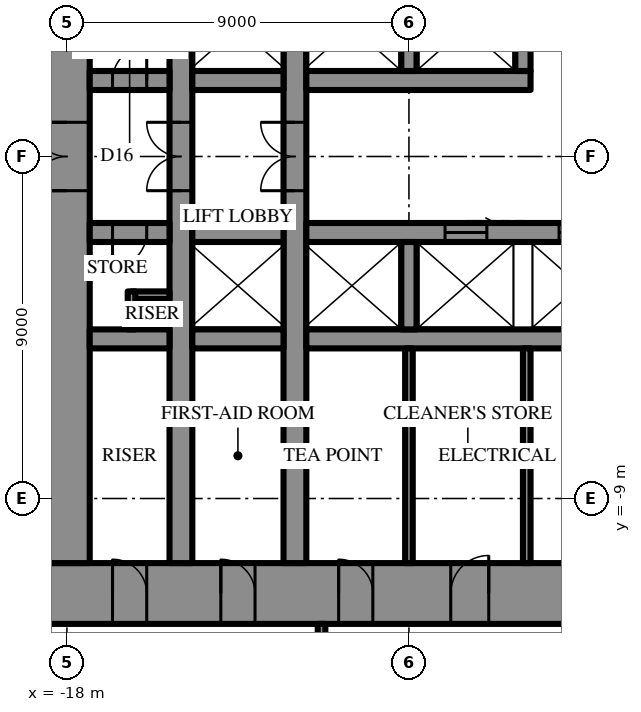
"""IFC4 building model, lengths in metres.
Left out: names, types, materials, properties, quantities, classifications, styles, units other than length and angle.
Written with IfcOpenShell. Run it as: python <this file> out.ifc"""

import sys

from ifc_helpers import new_model, si_unit, direction, frame, frame_2d, origin, place, context, subcontext, project, spatial, rectangle, extrude, element, fill, save


model = new_model("IFC4")
c1 = context("Model", 3, precision=1e-05, world=origin(), true_north=direction((0.0, 1.0)))
c2 = subcontext(c1, "Body", "Model", "MODEL_VIEW")
j1 = project(units=[si_unit("LENGTHUNIT", "METRE"), si_unit("PLANEANGLEUNIT", "RADIAN")], contexts=[c1])
p1 = place(None, origin())
s1 = spatial("IfcSite", under=j1, at=p1, CompositionType="ELEMENT")
p2 = place(p1, origin())
s2 = spatial("IfcBuilding", under=s1, at=p2, CompositionType="ELEMENT")
p3 = place(p2, frame((0.0, 0.0, 190.9)))
s3 = spatial("IfcBuildingStorey", under=s2, at=p3, CompositionType="ELEMENT", Elevation=190.9)
p4 = place(p3, frame((18.6, -11.5, 0.0), z_axis=(0.0, 0.0, 1.0), x_axis=(-1.0, 0.0, 0.0)))
e1 = element("IfcWall", 1, at=p4, inside=s3, PredefinedType="SHEAR", context=c2, shape_type="SweptSolid", body=[
    extrude(rectangle(XDim=37.2, YDim=1.6, at=frame_2d((18.6, 0.0))), origin(), (0.0, 0.0, 1.0), 4.2),
])
p5 = place(p4, frame((19.45, 0.0, 0.0)))
e2 = element("IfcOpeningElement", 2, at=p5, cuts=e1, PredefinedType="OPENING", context=c2, shape_type="SweptSolid", body=[
    extrude(rectangle(XDim=0.9, YDim=2.2, at=frame_2d((0.45, 1.1))), frame((0.0, 0.81, 0.0), z_axis=(0.0, -1.0, 0.0), x_axis=(1.0, 0.0, 0.0)), (0.0, 0.0, 1.0), 1.62),
])
p6 = place(p4, frame((22.45, 0.0, 0.0)))
e3 = element("IfcOpeningElement", 3, at=p6, cuts=e1, PredefinedType="OPENING", context=c2, shape_type="SweptSolid", body=[
    extrude(rectangle(XDim=0.9, YDim=2.2, at=frame_2d((0.45, 1.1))), frame((0.0, 0.81, 0.0), z_axis=(0.0, -1.0, 0.0), x_axis=(1.0, 0.0, 0.0)), (0.0, 0.0, 1.0), 1.62),
])
p7 = place(p4, frame((25.5, 0.0, 0.0)))
e4 = element("IfcOpeningElement", 4, at=p7, cuts=e1, PredefinedType="OPENING", context=c2, shape_type="SweptSolid", body=[
    extrude(rectangle(XDim=1.0, YDim=2.2, at=frame_2d((0.5, 1.1))), frame((0.0, 0.81, 0.0), z_axis=(0.0, -1.0, 0.0), x_axis=(1.0, 0.0, 0.0)), (0.0, 0.0, 1.0), 1.62),
])
p8 = place(p4, frame((1.8, 0.0, 0.0)))
e5 = element("IfcOpeningElement", 5, at=p8, cuts=e1, PredefinedType="OPENING", context=c2, shape_type="SweptSolid", body=[
    extrude(rectangle(XDim=0.9, YDim=2.2, at=frame_2d((0.45, 1.1))), frame((0.0, 0.81, 0.0), z_axis=(0.0, -1.0, 0.0), x_axis=(1.0, 0.0, 0.0)), (0.0, 0.0, 1.0), 1.62),
])
p9 = place(p4, frame((4.65, 0.0, 0.0)))
e6 = element("IfcOpeningElement", 6, at=p9, cuts=e1, PredefinedType="OPENING", context=c2, shape_type="SweptSolid", body=[
    extrude(rectangle(XDim=0.9, YDim=2.2, at=frame_2d((0.45, 1.1))), frame((0.0, 0.81, 0.0), z_axis=(0.0, -1.0, 0.0), x_axis=(1.0, 0.0, 0.0)), (0.0, 0.0, 1.0), 1.62),
])
p10 = place(p4, frame((7.75, 0.0, 0.0)))
e7 = element("IfcOpeningElement", 7, at=p10, cuts=e1, PredefinedType="OPENING", context=c2, shape_type="SweptSolid", body=[
    extrude(rectangle(XDim=0.9, YDim=2.2, at=frame_2d((0.45, 1.1))), frame((0.0, 0.81, 0.0), z_axis=(0.0, -1.0, 0.0), x_axis=(1.0, 0.0, 0.0)), (0.0, 0.0, 1.0), 1.62),
])
p11 = place(p4, frame((28.55, 0.0, 0.0)))
e8 = element("IfcOpeningElement", 8, at=p11, cuts=e1, PredefinedType="OPENING", context=c2, shape_type="SweptSolid", body=[
    extrude(rectangle(XDim=0.9, YDim=2.2, at=frame_2d((0.45, 1.1))), frame((0.0, 0.81, 0.0), z_axis=(0.0, -1.0, 0.0), x_axis=(1.0, 0.0, 0.0)), (0.0, 0.0, 1.0), 1.62),
])
p12 = place(p4, frame((31.65, 0.0, 0.0)))
e9 = element("IfcOpeningElement", 9, at=p12, cuts=e1, PredefinedType="OPENING", context=c2, shape_type="SweptSolid", body=[
    extrude(rectangle(XDim=0.9, YDim=2.2, at=frame_2d((0.45, 1.1))), frame((0.0, 0.81, 0.0), z_axis=(0.0, -1.0, 0.0), x_axis=(1.0, 0.0, 0.0)), (0.0, 0.0, 1.0), 1.62),
])
p13 = place(p4, frame((34.5, 0.0, 0.0)))
e10 = element("IfcOpeningElement", 10, at=p13, cuts=e1, PredefinedType="OPENING", context=c2, shape_type="SweptSolid", body=[
    extrude(rectangle(XDim=0.9, YDim=2.2, at=frame_2d((0.45, 1.1))), frame((0.0, 0.81, 0.0), z_axis=(0.0, -1.0, 0.0), x_axis=(1.0, 0.0, 0.0)), (0.0, 0.0, 1.0), 1.62),
])
p14 = place(p3, frame((-18.0, 10.7, 0.0), z_axis=(0.0, 0.0, 1.0), x_axis=(0.0, -1.0, 0.0)))
e11 = element("IfcWall", 11, at=p14, inside=s3, PredefinedType="SHEAR", context=c2, shape_type="SweptSolid", body=[
    extrude(rectangle(XDim=21.4, YDim=1.2, at=frame_2d((10.7, 0.0))), origin(), (0.0, 0.0, 1.0), 4.2),
])
p15 = place(p14, frame((9.8, 0.0, 0.0)))
e12 = element("IfcOpeningElement", 12, at=p15, cuts=e11, PredefinedType="OPENING", context=c2, shape_type="SweptSolid", body=[
    extrude(rectangle(XDim=1.8, YDim=2.4, at=frame_2d((0.9, 1.2))), frame((0.0, 0.61, 0.0), z_axis=(0.0, -1.0, 0.0), x_axis=(1.0, 0.0, 0.0)), (0.0, 0.0, 1.0), 1.22),
])
p16 = place(p3, frame((-12.0, -10.7, 0.0), z_axis=(0.0, 0.0, 1.0), x_axis=(0.0, 1.0, 0.0)))
e13 = element("IfcWall", 13, at=p16, inside=s3, PredefinedType="SHEAR", context=c2, shape_type="SweptSolid", body=[
    extrude(rectangle(XDim=21.4, YDim=0.6, at=frame_2d((10.7, 0.0))), origin(), (0.0, 0.0, 1.0), 4.2),
])
p17 = place(p16, frame((9.8, 0.0, 0.0)))
e14 = element("IfcOpeningElement", 14, at=p17, cuts=e13, PredefinedType="OPENING", context=c2, shape_type="SweptSolid", body=[
    extrude(rectangle(XDim=1.8, YDim=2.4, at=frame_2d((0.9, 1.2))), frame((0.0, 0.31, 0.0), z_axis=(0.0, -1.0, 0.0), x_axis=(1.0, 0.0, 0.0)), (0.0, 0.0, 1.0), 0.62),
])
p18 = place(p3, frame((-15.0, -10.7, 0.0), z_axis=(0.0, 0.0, 1.0), x_axis=(0.0, 1.0, 0.0)))
e15 = element("IfcWall", 15, at=p18, inside=s3, PredefinedType="SHEAR", context=c2, shape_type="SweptSolid", body=[
    extrude(rectangle(XDim=21.4, YDim=0.6, at=frame_2d((10.7, 0.0))), origin(), (0.0, 0.0, 1.0), 4.2),
])
p19 = place(p18, frame((9.8, 0.0, 0.0)))
e16 = element("IfcOpeningElement", 16, at=p19, cuts=e15, PredefinedType="OPENING", context=c2, shape_type="SweptSolid", body=[
    extrude(rectangle(XDim=1.8, YDim=2.4, at=frame_2d((0.9, 1.2))), frame((0.0, 0.31, 0.0), z_axis=(0.0, -1.0, 0.0), x_axis=(1.0, 0.0, 0.0)), (0.0, 0.0, 1.0), 0.62),
])
p20 = place(p3, frame((-17.4, 2.0, 0.0), z_axis=(0.0, 0.0, 1.0), x_axis=(1.0, 0.0, 0.0)))
e17 = element("IfcWall", 17, at=p20, inside=s3, PredefinedType="SHEAR", context=c2, shape_type="SweptSolid", body=[
    extrude(rectangle(XDim=2.1, YDim=0.5, at=frame_2d((1.05, 0.0))), origin(), (0.0, 0.0, 1.0), 4.2),
])
p21 = place(p20, frame((0.6, 0.0, 0.0)))
e18 = element("IfcOpeningElement", 18, at=p21, cuts=e17, PredefinedType="OPENING", context=c2, shape_type="SweptSolid", body=[
    extrude(rectangle(XDim=0.9, YDim=2.2, at=frame_2d((0.45, 1.1))), frame((0.0, 0.26, 0.0), z_axis=(0.0, -1.0, 0.0), x_axis=(1.0, 0.0, 0.0)), (0.0, 0.0, 1.0), 0.52),
])
p22 = place(p3, frame((-14.7, 2.0, 0.0), z_axis=(0.0, 0.0, 1.0), x_axis=(1.0, 0.0, 0.0)))
e19 = element("IfcWall", 19, at=p22, inside=s3, PredefinedType="SHEAR", context=c2, shape_type="SweptSolid", body=[
    extrude(rectangle(XDim=2.4, YDim=0.5, at=frame_2d((1.2, 0.0))), origin(), (0.0, 0.0, 1.0), 4.2),
])
p23 = place(p3, frame((-11.7, 2.0, 0.0), z_axis=(0.0, 0.0, 1.0), x_axis=(1.0, 0.0, 0.0)))
e20 = element("IfcWall", 20, at=p23, inside=s3, PredefinedType="SHEAR", context=c2, shape_type="SweptSolid", body=[
    extrude(rectangle(XDim=5.9, YDim=0.5, at=frame_2d((2.95, 0.0))), origin(), (0.0, 0.0, 1.0), 4.2),
])
for number, where, z_axis, x_axis in (
    (21, (-9.0, 2.25, 0.0), (0.0, 0.0, 1.0), (0.0, 1.0, 0.0)),
    (22, (-6.0, 2.25, 0.0), (0.0, 0.0, 1.0), (0.0, 1.0, 0.0)),
):
    element("IfcWall", number, at=place(p3, frame(where, z_axis=z_axis, x_axis=x_axis)), inside=s3, PredefinedType="SHEAR", context=c2, shape_type="SweptSolid", body=[
        extrude(rectangle(XDim=2.3, YDim=0.4, at=frame_2d((1.15, 0.0))), origin(), (0.0, 0.0, 1.0), 4.2),
    ])
p24 = place(p3, frame((3.2, -2.0, 0.0), z_axis=(0.0, 0.0, 1.0), x_axis=(-1.0, 0.0, 0.0)))
e23 = element("IfcWall", 23, at=p24, inside=s3, PredefinedType="SHEAR", context=c2, shape_type="SweptSolid", body=[
    extrude(rectangle(XDim=14.9, YDim=0.5, at=frame_2d((7.45, 0.0))), origin(), (0.0, 0.0, 1.0), 4.2),
])
p25 = place(p24, frame((1.15, 0.0, 0.0)))
e24 = element("IfcOpeningElement", 24, at=p25, cuts=e23, PredefinedType="OPENING", context=c2, shape_type="SweptSolid", body=[
    extrude(rectangle(XDim=1.1, YDim=2.2, at=frame_2d((0.55, 1.1))), frame((0.0, 0.26, 0.0), z_axis=(0.0, -1.0, 0.0), x_axis=(1.0, 0.0, 0.0)), (0.0, 0.0, 1.0), 0.52),
])
p26 = place(p24, frame((4.15, 0.0, 0.0)))
e25 = element("IfcOpeningElement", 25, at=p26, cuts=e23, PredefinedType="OPENING", context=c2, shape_type="SweptSolid", body=[
    extrude(rectangle(XDim=1.1, YDim=2.2, at=frame_2d((0.55, 1.1))), frame((0.0, 0.26, 0.0), z_axis=(0.0, -1.0, 0.0), x_axis=(1.0, 0.0, 0.0)), (0.0, 0.0, 1.0), 0.52),
])
p27 = place(p24, frame((7.15, 0.0, 0.0)))
e26 = element("IfcOpeningElement", 26, at=p27, cuts=e23, PredefinedType="OPENING", context=c2, shape_type="SweptSolid", body=[
    extrude(rectangle(XDim=1.1, YDim=2.2, at=frame_2d((0.55, 1.1))), frame((0.0, 0.26, 0.0), z_axis=(0.0, -1.0, 0.0), x_axis=(1.0, 0.0, 0.0)), (0.0, 0.0, 1.0), 0.52),
])
p28 = place(p24, frame((10.15, 0.0, 0.0)))
e27 = element("IfcOpeningElement", 27, at=p28, cuts=e23, PredefinedType="OPENING", context=c2, shape_type="SweptSolid", body=[
    extrude(rectangle(XDim=1.1, YDim=2.2, at=frame_2d((0.55, 1.1))), frame((0.0, 0.26, 0.0), z_axis=(0.0, -1.0, 0.0), x_axis=(1.0, 0.0, 0.0)), (0.0, 0.0, 1.0), 0.52),
])
p29 = place(p3, frame((-12.3, -2.0, 0.0), z_axis=(0.0, 0.0, 1.0), x_axis=(-1.0, 0.0, 0.0)))
e28 = element("IfcWall", 28, at=p29, inside=s3, PredefinedType="SHEAR", context=c2, shape_type="SweptSolid", body=[
    extrude(rectangle(XDim=2.4, YDim=0.5, at=frame_2d((1.2, 0.0))), origin(), (0.0, 0.0, 1.0), 4.2),
])
p30 = place(p3, frame((-15.3, -2.0, 0.0), z_axis=(0.0, 0.0, 1.0), x_axis=(-1.0, 0.0, 0.0)))
e29 = element("IfcWall", 29, at=p30, inside=s3, PredefinedType="SHEAR", context=c2, shape_type="SweptSolid", body=[
    extrude(rectangle(XDim=2.1, YDim=0.5, at=frame_2d((1.05, 0.0))), origin(), (0.0, 0.0, 1.0), 4.2),
])
p31 = place(p30, frame((0.6, 0.0, 0.0)))
e30 = element("IfcOpeningElement", 30, at=p31, cuts=e29, PredefinedType="OPENING", context=c2, shape_type="SweptSolid", body=[
    extrude(rectangle(XDim=0.9, YDim=2.2, at=frame_2d((0.45, 1.1))), frame((0.0, 0.26, 0.0), z_axis=(0.0, -1.0, 0.0), x_axis=(1.0, 0.0, 0.0)), (0.0, 0.0, 1.0), 0.52),
])
p32 = place(p3, frame((11.7, -4.8, 0.0), z_axis=(0.0, 0.0, 1.0), x_axis=(-1.0, 0.0, 0.0)))
e31 = element("IfcWall", 31, at=p32, inside=s3, PredefinedType="SHEAR", context=c2, shape_type="SweptSolid", body=[
    extrude(rectangle(XDim=23.4, YDim=0.5, at=frame_2d((11.7, 0.0))), origin(), (0.0, 0.0, 1.0), 4.2),
])
p33 = place(p32, frame((6.6, 0.0, 0.0)))
e32 = element("IfcOpeningElement", 32, at=p33, cuts=e31, PredefinedType="OPENING", context=c2, shape_type="SweptSolid", body=[
    extrude(rectangle(XDim=1.2, YDim=2.2, at=frame_2d((0.6, 1.1))), frame((0.0, 0.26, 0.0), z_axis=(0.0, -1.0, 0.0), x_axis=(1.0, 0.0, 0.0)), (0.0, 0.0, 1.0), 0.52),
])
p34 = place(p32, frame((3.6, 0.0, 0.0)))
e33 = element("IfcOpeningElement", 33, at=p34, cuts=e31, PredefinedType="OPENING", context=c2, shape_type="SweptSolid", body=[
    extrude(rectangle(XDim=1.2, YDim=2.2, at=frame_2d((0.6, 1.1))), frame((0.0, 0.26, 0.0), z_axis=(0.0, -1.0, 0.0), x_axis=(1.0, 0.0, 0.0)), (0.0, 0.0, 1.0), 0.52),
])
p35 = place(p3, frame((-12.3, -4.8, 0.0), z_axis=(0.0, 0.0, 1.0), x_axis=(-1.0, 0.0, 0.0)))
e34 = element("IfcWall", 34, at=p35, inside=s3, PredefinedType="SHEAR", context=c2, shape_type="SweptSolid", body=[
    extrude(rectangle(XDim=2.4, YDim=0.5, at=frame_2d((1.2, 0.0))), origin(), (0.0, 0.0, 1.0), 4.2),
])
p36 = place(p3, frame((-15.3, -4.8, 0.0), z_axis=(0.0, 0.0, 1.0), x_axis=(-1.0, 0.0, 0.0)))
e35 = element("IfcWall", 35, at=p36, inside=s3, PredefinedType="SHEAR", context=c2, shape_type="SweptSolid", body=[
    extrude(rectangle(XDim=2.1, YDim=0.5, at=frame_2d((1.05, 0.0))), origin(), (0.0, 0.0, 1.0), 4.2),
])
p37 = place(p3, frame((-9.0, -2.25, 0.0), z_axis=(0.0, 0.0, 1.0), x_axis=(0.0, -1.0, 0.0)))
e36 = element("IfcWall", 36, at=p37, inside=s3, PredefinedType="SHEAR", context=c2, shape_type="SweptSolid", body=[
    extrude(rectangle(XDim=2.3, YDim=0.4, at=frame_2d((1.15, 0.0))), origin(), (0.0, 0.0, 1.0), 4.2),
])
for number, where, z_axis, x_axis in (
    (37, (-9.0, -5.05, 0.0), (0.0, 0.0, 1.0), (0.0, -1.0, 0.0)),
    (38, (-5.9, -5.05, 0.0), (0.0, 0.0, 1.0), (0.0, -1.0, 0.0)),
):
    element("IfcWall", number, at=place(p3, frame(where, z_axis=z_axis, x_axis=x_axis)), inside=s3, PredefinedType="PARTITIONING", context=c2, shape_type="SweptSolid", body=[
        extrude(rectangle(XDim=5.65, YDim=0.2, at=frame_2d((2.825, 0.0))), origin(), (0.0, 0.0, 1.0), 4.0),
    ])
for number, where, z_axis, x_axis in (
    (39, (-15.3, -3.65, 0.0), (0.0, 0.0, 1.0), (-1.0, 0.0, 0.0)),
    (40, (-16.3, -3.55, 0.0), (0.0, 0.0, 1.0), (0.0, -1.0, 0.0)),
):
    element("IfcWall", number, at=place(p3, frame(where, z_axis=z_axis, x_axis=x_axis)), inside=s3, PredefinedType="PARTITIONING", context=c2, shape_type="SweptSolid", body=[
        extrude(rectangle(XDim=1.0, YDim=0.2, at=frame_2d((0.5, 0.0))), origin(), (0.0, 0.0, 1.0), 4.0),
    ])
p38 = place(p3, frame((-11.3, -12.3, 0.0), z_axis=(0.0, 0.0, 1.0), x_axis=(0.0, -1.0, 0.0)))
e41 = element("IfcWall", 41, at=p38, inside=s3, PredefinedType="PARTITIONING", context=c2, shape_type="SweptSolid", body=[
    extrude(rectangle(XDim=19.0, YDim=0.2, at=frame_2d((9.5, 0.0))), origin(), (0.0, 0.0, 1.0), 4.0),
])
p39 = place(p38, frame((1.4, 0.0, 0.0)))
e42 = element("IfcOpeningElement", 42, at=p39, cuts=e41, PredefinedType="OPENING", context=c2, shape_type="SweptSolid", body=[
    extrude(rectangle(XDim=1.0, YDim=2.2, at=frame_2d((0.5, 1.1))), frame((0.0, 0.11, 0.0), z_axis=(0.0, -1.0, 0.0), x_axis=(1.0, 0.0, 0.0)), (0.0, 0.0, 1.0), 0.22),
])
p40 = place(p15, frame((1.8, 0.0, 0.0), z_axis=(0.0, 0.0, 1.0), x_axis=(-1.0, 0.0, 0.0)))
e43 = element("IfcDoor", 43, at=p40, inside=s3, OperationType="DOUBLE_DOOR_SINGLE_SWING", PredefinedType="DOOR", context=c2, shape_type="SweptSolid", body=[
    extrude(rectangle(XDim=1.8, YDim=2.4, at=frame_2d((0.9, 1.2))), frame((0.0, 0.025, 0.0), z_axis=(0.0, -1.0, 0.0), x_axis=(1.0, 0.0, 0.0)), (0.0, 0.0, 1.0), 0.05),
])
fill(e12, e43)
p41 = place(p7, frame((1.0, 0.0, 0.0), z_axis=(0.0, 0.0, 1.0), x_axis=(-1.0, 0.0, 0.0)))
e44 = element("IfcDoor", 44, at=p41, inside=s3, OperationType="SINGLE_SWING_LEFT", PredefinedType="DOOR", context=c2, shape_type="SweptSolid", body=[
    extrude(rectangle(XDim=1.0, YDim=2.2, at=frame_2d((0.5, 1.1))), frame((0.0, 0.025, 0.0), z_axis=(0.0, -1.0, 0.0), x_axis=(1.0, 0.0, 0.0)), (0.0, 0.0, 1.0), 0.05),
])
fill(e4, e44)
p42 = place(p11, frame((0.9, 0.0, 0.0), z_axis=(0.0, 0.0, 1.0), x_axis=(-1.0, 0.0, 0.0)))
e45 = element("IfcDoor", 45, at=p42, inside=s3, OperationType="SINGLE_SWING_RIGHT", PredefinedType="DOOR", context=c2, shape_type="SweptSolid", body=[
    extrude(rectangle(XDim=0.9, YDim=2.2, at=frame_2d((0.45, 1.1))), frame((0.0, 0.025, 0.0), z_axis=(0.0, -1.0, 0.0), x_axis=(1.0, 0.0, 0.0)), (0.0, 0.0, 1.0), 0.05),
])
fill(e8, e45)
p43 = place(p12, frame((0.9, 0.0, 0.0), z_axis=(0.0, 0.0, 1.0), x_axis=(-1.0, 0.0, 0.0)))
e46 = element("IfcDoor", 46, at=p43, inside=s3, OperationType="SINGLE_SWING_RIGHT", PredefinedType="DOOR", context=c2, shape_type="SweptSolid", body=[
    extrude(rectangle(XDim=0.9, YDim=2.2, at=frame_2d((0.45, 1.1))), frame((0.0, 0.025, 0.0), z_axis=(0.0, -1.0, 0.0), x_axis=(1.0, 0.0, 0.0)), (0.0, 0.0, 1.0), 0.05),
])
fill(e9, e46)
p44 = place(p13, frame((0.9, 0.0, 0.0), z_axis=(0.0, 0.0, 1.0), x_axis=(-1.0, 0.0, 0.0)))
e47 = element("IfcDoor", 47, at=p44, inside=s3, OperationType="SINGLE_SWING_RIGHT", PredefinedType="DOOR", context=c2, shape_type="SweptSolid", body=[
    extrude(rectangle(XDim=0.9, YDim=2.2, at=frame_2d((0.45, 1.1))), frame((0.0, 0.025, 0.0), z_axis=(0.0, -1.0, 0.0), x_axis=(1.0, 0.0, 0.0)), (0.0, 0.0, 1.0), 0.05),
])
fill(e10, e47)
p45 = place(p21, origin())
e48 = element("IfcDoor", 48, at=p45, inside=s3, OperationType="SINGLE_SWING_LEFT", PredefinedType="DOOR", context=c2, shape_type="SweptSolid", body=[
    extrude(rectangle(XDim=0.9, YDim=2.2, at=frame_2d((0.45, 1.1))), frame((0.0, 0.025, 0.0), z_axis=(0.0, -1.0, 0.0), x_axis=(1.0, 0.0, 0.0)), (0.0, 0.0, 1.0), 0.05),
])
fill(e18, e48)
p46 = place(p31, origin())
e49 = element("IfcDoor", 49, at=p46, inside=s3, OperationType="SINGLE_SWING_LEFT", PredefinedType="DOOR", context=c2, shape_type="SweptSolid", body=[
    extrude(rectangle(XDim=0.9, YDim=2.2, at=frame_2d((0.45, 1.1))), frame((0.0, 0.025, 0.0), z_axis=(0.0, -1.0, 0.0), x_axis=(1.0, 0.0, 0.0)), (0.0, 0.0, 1.0), 0.05),
])
fill(e30, e49)
p47 = place(p17, origin())
e50 = element("IfcDoor", 50, at=p47, inside=s3, OperationType="DOUBLE_DOOR_SINGLE_SWING", PredefinedType="DOOR", context=c2, shape_type="SweptSolid", body=[
    extrude(rectangle(XDim=1.8, YDim=2.4, at=frame_2d((0.9, 1.2))), frame((0.0, 0.025, 0.0), z_axis=(0.0, -1.0, 0.0), x_axis=(1.0, 0.0, 0.0)), (0.0, 0.0, 1.0), 0.05),
])
fill(e14, e50)
p48 = place(p19, origin())
e51 = element("IfcDoor", 51, at=p48, inside=s3, OperationType="DOUBLE_DOOR_SINGLE_SWING", PredefinedType="DOOR", context=c2, shape_type="SweptSolid", body=[
    extrude(rectangle(XDim=1.8, YDim=2.4, at=frame_2d((0.9, 1.2))), frame((0.0, 0.025, 0.0), z_axis=(0.0, -1.0, 0.0), x_axis=(1.0, 0.0, 0.0)), (0.0, 0.0, 1.0), 0.05),
])
fill(e16, e51)
p49 = place(p27, frame((1.1, 0.0, 0.0), z_axis=(0.0, 0.0, 1.0), x_axis=(-1.0, 0.0, 0.0)))
e52 = element("IfcDoor", 52, at=p49, inside=s3, OperationType="SLIDING_TO_LEFT", PredefinedType="DOOR", context=c2, shape_type="SweptSolid", body=[
    extrude(rectangle(XDim=1.1, YDim=2.2, at=frame_2d((0.55, 1.1))), frame((0.0, 0.025, 0.0), z_axis=(0.0, -1.0, 0.0), x_axis=(1.0, 0.0, 0.0)), (0.0, 0.0, 1.0), 0.05),
])
fill(e26, e52)
p50 = place(p28, frame((1.1, 0.0, 0.0), z_axis=(0.0, 0.0, 1.0), x_axis=(-1.0, 0.0, 0.0)))
e53 = element("IfcDoor", 53, at=p50, inside=s3, OperationType="SLIDING_TO_LEFT", PredefinedType="DOOR", context=c2, shape_type="SweptSolid", body=[
    extrude(rectangle(XDim=1.1, YDim=2.2, at=frame_2d((0.55, 1.1))), frame((0.0, 0.025, 0.0), z_axis=(0.0, -1.0, 0.0), x_axis=(1.0, 0.0, 0.0)), (0.0, 0.0, 1.0), 0.05),
])
fill(e27, e53)
save(model, sys.argv[1])
